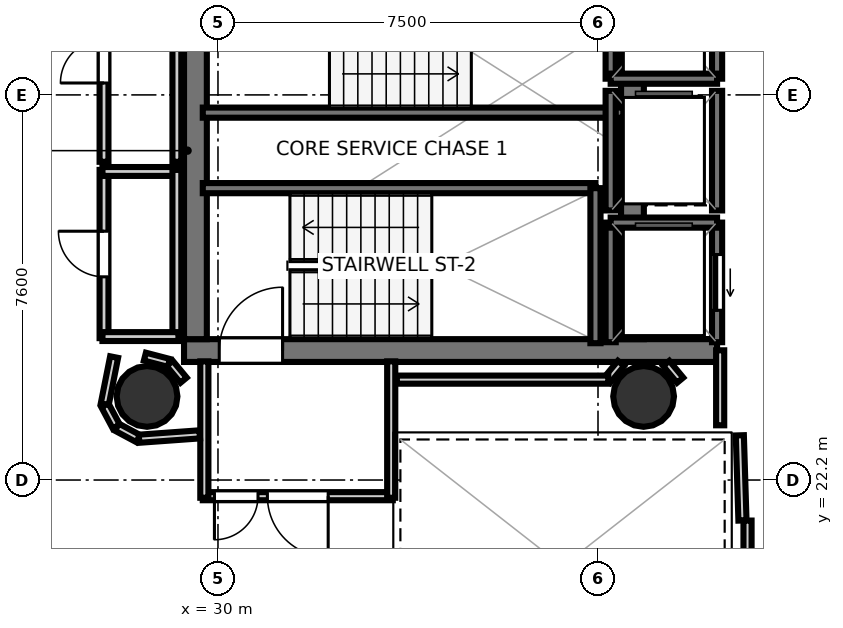
"""IFC4 building model, lengths in metres.
Left out: names, types, materials, properties, quantities, classifications, styles, units other than length and angle.
Written with IfcOpenShell. Run it as: python <this file> out.ifc"""

import sys

from ifc_helpers import new_model, si_unit, direction, frame, frame_2d, origin, origin_2d, place, context, subcontext, project, spatial, rectangle, hollow_circle, extrude, element, fill, save


model = new_model("IFC4")
c1 = context("Model", 3, precision=1e-05, world=origin(), true_north=direction((0.0, 1.0)))
c2 = subcontext(c1, "Body", "Model", "MODEL_VIEW")
j1 = project(units=[si_unit("LENGTHUNIT", "METRE"), si_unit("PLANEANGLEUNIT", "RADIAN")], contexts=[c1])
p1 = place(None, origin())
s1 = spatial("IfcSite", under=j1, at=p1, CompositionType="ELEMENT")
p2 = place(p1, origin())
s2 = spatial("IfcBuilding", under=s1, at=p2, CompositionType="ELEMENT")
p3 = place(p2, frame((0.0, 0.0, 204.0)))
s3 = spatial("IfcBuildingStorey", under=s2, at=p3, CompositionType="ELEMENT", Elevation=204.0)
p4 = place(p3, frame((29.33, 24.755, 0.0), z_axis=(0.0, 0.0, 1.0), x_axis=(1.0, 0.0, 0.0)))
e1 = element("IfcWall", 1, at=p4, inside=s3, PredefinedType="SHEAR", context=c2, shape_type="SweptSolid", body=[
    extrude(rectangle(XDim=10.52, YDim=0.45, at=frame_2d((5.26, 0.0))), origin(), (0.0, 0.0, 1.0), 3.52),
])
p5 = place(p4, frame((0.695, 0.0, 0.0)))
e2 = element("IfcOpeningElement", 2, at=p5, cuts=e1, PredefinedType="OPENING", context=c2, shape_type="SweptSolid", body=[
    extrude(rectangle(XDim=1.25, YDim=2.15, at=frame_2d((0.625, 1.075))), frame((0.0, 0.235, 0.0), z_axis=(0.0, -1.0, 0.0), x_axis=(1.0, 0.0, 0.0)), (0.0, 0.0, 1.0), 0.47),
])
for number, where, z_axis, x_axis in (
    (3, (29.555, 24.98, 0.0), (0.0, 0.0, 1.0), (0.0, 1.0, 0.0)),
    (4, (38.18, 24.98, 0.0), (0.0, 0.0, 1.0), (0.0, 1.0, 0.0)),
):
    element("IfcWall", number, at=place(p3, frame(where, z_axis=z_axis, x_axis=x_axis)), inside=s3, PredefinedType="SHEAR", context=c2, shape_type="SweptSolid", body=[
        extrude(rectangle(XDim=7.44, YDim=0.45, at=frame_2d((3.72, 0.0))), origin(), (0.0, 0.0, 1.0), 3.52),
    ])
for number, where, z_axis, x_axis in (
    (5, (28.6, 23.85, 0.0), (0.0, 0.0, 1.0), (1.0, 0.0, 0.0)),
    (6, (38.4, 23.85, 0.0), (0.0, 0.0, 1.0), (1.0, 0.0, 0.0)),
):
    element("IfcColumn", number, at=place(p3, frame(where, z_axis=z_axis, x_axis=x_axis)), inside=s3, PredefinedType="COLUMN", context=c2, shape_type="SweptSolid", body=[
        extrude(hollow_circle(Radius=0.6, WallThickness=0.03, at=origin_2d()), origin(), (0.0, 0.0, 1.0), 3.7),
    ])
p6 = place(p3, frame((29.7, 29.45, 0.0), z_axis=(0.0, 0.0, 1.0), x_axis=(1.0, 0.0, 0.0)))
e7 = element("IfcWall", 7, at=p6, inside=s3, PredefinedType="SOLIDWALL", context=c2, shape_type="SweptSolid", body=[
    extrude(rectangle(XDim=8.3, YDim=0.2, at=frame_2d((4.15, 0.0))), origin(), (0.0, 0.0, 1.0), 3.52),
])
p7 = place(p3, frame((29.7, 27.96, 0.0), z_axis=(0.0, 0.0, 1.0), x_axis=(1.0, 0.0, 0.0)))
e8 = element("IfcWall", 8, at=p7, inside=s3, PredefinedType="SOLIDWALL", context=c2, shape_type="SweptSolid", body=[
    extrude(rectangle(XDim=7.75, YDim=0.2, at=frame_2d((3.875, 0.0))), origin(), (0.0, 0.0, 1.0), 3.52),
])
p8 = place(p3, frame((37.45, 24.9, 0.0), z_axis=(0.0, 0.0, 1.0), x_axis=(0.0, 1.0, 0.0)))
e9 = element("IfcWall", 9, at=p8, inside=s3, PredefinedType="SOLIDWALL", context=c2, shape_type="SweptSolid", body=[
    extrude(rectangle(XDim=3.06, YDim=0.2, at=frame_2d((1.53, 0.0))), origin(), (0.0, 0.0, 1.0), 3.52),
])
p9 = place(p3, frame((39.85, 30.12, 0.0), z_axis=(0.0, 0.0, 1.0), x_axis=(0.0, 1.0, 0.0)))
e10 = element("IfcWall", 10, at=p9, inside=s3, PredefinedType="SOLIDWALL", context=c2, shape_type="SweptSolid", body=[
    extrude(rectangle(XDim=2.36, YDim=0.2, at=frame_2d((1.18, 0.0))), origin(), (0.0, 0.0, 1.0), 3.52),
])
p10 = place(p9, frame((0.63, 0.0, 0.0)))
e11 = element("IfcOpeningElement", 11, at=p10, cuts=e10, PredefinedType="OPENING", context=c2, shape_type="SweptSolid", body=[
    extrude(rectangle(XDim=1.1, YDim=2.15, at=frame_2d((0.55, 1.075))), frame((0.0, 0.11, 0.0), z_axis=(0.0, -1.0, 0.0), x_axis=(1.0, 0.0, 0.0)), (0.0, 0.0, 1.0), 0.22),
])
p11 = place(p3, frame((37.75, 30.12, 0.0), z_axis=(0.0, 0.0, 1.0), x_axis=(0.0, 1.0, 0.0)))
e12 = element("IfcWall", 12, at=p11, inside=s3, PredefinedType="SOLIDWALL", context=c2, shape_type="SweptSolid", body=[
    extrude(rectangle(XDim=2.36, YDim=0.2, at=frame_2d((1.18, 0.0))), origin(), (0.0, 0.0, 1.0), 3.52),
])
p12 = place(p3, frame((37.75, 30.12, 0.0), z_axis=(0.0, 0.0, 1.0), x_axis=(1.0, 0.0, 0.0)))
e13 = element("IfcWall", 13, at=p12, inside=s3, PredefinedType="SOLIDWALL", context=c2, shape_type="SweptSolid", body=[
    extrude(rectangle(XDim=2.1, YDim=0.2, at=frame_2d((1.05, 0.0))), origin(), (0.0, 0.0, 1.0), 3.52),
])
p13 = place(p3, frame((39.85, 24.92, 0.0), z_axis=(0.0, 0.0, 1.0), x_axis=(0.0, 1.0, 0.0)))
e14 = element("IfcWall", 14, at=p13, inside=s3, PredefinedType="SOLIDWALL", context=c2, shape_type="SweptSolid", body=[
    extrude(rectangle(XDim=2.36, YDim=0.2, at=frame_2d((1.18, 0.0))), origin(), (0.0, 0.0, 1.0), 3.52),
])
p14 = place(p13, frame((0.63, 0.0, 0.0)))
e15 = element("IfcOpeningElement", 15, at=p14, cuts=e14, PredefinedType="OPENING", context=c2, shape_type="SweptSolid", body=[
    extrude(rectangle(XDim=1.1, YDim=2.15, at=frame_2d((0.55, 1.075))), frame((0.0, 0.11, 0.0), z_axis=(0.0, -1.0, 0.0), x_axis=(1.0, 0.0, 0.0)), (0.0, 0.0, 1.0), 0.22),
])
p15 = place(p3, frame((37.75, 24.92, 0.0), z_axis=(0.0, 0.0, 1.0), x_axis=(0.0, 1.0, 0.0)))
e16 = element("IfcWall", 16, at=p15, inside=s3, PredefinedType="SOLIDWALL", context=c2, shape_type="SweptSolid", body=[
    extrude(rectangle(XDim=2.36, YDim=0.2, at=frame_2d((1.18, 0.0))), origin(), (0.0, 0.0, 1.0), 3.52),
])
p16 = place(p3, frame((37.75, 27.28, 0.0), z_axis=(0.0, 0.0, 1.0), x_axis=(1.0, 0.0, 0.0)))
e17 = element("IfcWall", 17, at=p16, inside=s3, PredefinedType="SOLIDWALL", context=c2, shape_type="SweptSolid", body=[
    extrude(rectangle(XDim=2.1, YDim=0.2, at=frame_2d((1.05, 0.0))), origin(), (0.0, 0.0, 1.0), 3.52),
])
for number, where, z_axis, x_axis in (
    (18, (39.85, 27.52, 0.0), (0.0, 0.0, 1.0), (0.0, 1.0, 0.0)),
    (19, (37.75, 27.52, 0.0), (0.0, 0.0, 1.0), (0.0, 1.0, 0.0)),
):
    element("IfcWall", number, at=place(p3, frame(where, z_axis=z_axis, x_axis=x_axis)), inside=s3, PredefinedType="SOLIDWALL", context=c2, shape_type="SweptSolid", body=[
        extrude(rectangle(XDim=2.36, YDim=0.2, at=frame_2d((1.18, 0.0))), origin(), (0.0, 0.0, 1.0), 3.52),
    ])
p17 = place(p3, frame((33.45, 21.881, 0.0), z_axis=(0.0, 0.0, 1.0), x_axis=(-1.0, 0.0, 0.0)))
e20 = element("IfcWall", 20, at=p17, inside=s3, PredefinedType="PARTITIONING", context=c2, shape_type="SweptSolid", body=[
    extrude(rectangle(XDim=3.75, YDim=0.16, at=frame_2d((1.875, 0.0))), origin(), (0.0, 0.0, 1.0), 2.84),
])
p18 = place(p17, frame((1.275, 0.0, 0.0)))
e21 = element("IfcOpeningElement", 21, at=p18, cuts=e20, PredefinedType="OPENING", context=c2, shape_type="SweptSolid", body=[
    extrude(rectangle(XDim=1.2, YDim=2.15, at=frame_2d((0.6, 1.075))), frame((0.0, 0.09, 0.0), z_axis=(0.0, -1.0, 0.0), x_axis=(1.0, 0.0, 0.0)), (0.0, 0.0, 1.0), 0.18),
])
p19 = place(p17, frame((2.66, 0.0, 0.0)))
e22 = element("IfcOpeningElement", 22, at=p19, cuts=e20, PredefinedType="OPENING", context=c2, shape_type="SweptSolid", body=[
    extrude(rectangle(XDim=0.86, YDim=2.05, at=frame_2d((0.43, 1.025))), frame((0.0, 0.09, 0.0), z_axis=(0.0, -1.0, 0.0), x_axis=(1.0, 0.0, 0.0)), (0.0, 0.0, 1.0), 0.18),
])
for number, where, z_axis, x_axis in (
    (23, (29.731, 21.85, 0.0), (0.0, 0.0, 1.0), (0.0, 1.0, 0.0)),
    (24, (33.419, 24.542, 0.0), (0.0, 0.0, 1.0), (0.0, -1.0, 0.0)),
):
    element("IfcWall", number, at=place(p3, frame(where, z_axis=z_axis, x_axis=x_axis)), inside=s3, PredefinedType="PARTITIONING", context=c2, shape_type="SweptSolid", body=[
        extrude(rectangle(XDim=2.692, YDim=0.16, at=frame_2d((1.346, 0.0))), origin(), (0.0, 0.0, 1.0), 2.84),
    ])
p20 = place(p3, frame((40.351, 21.401, 0.0), z_axis=(0.0, 0.0, 1.0), x_axis=(-0.031058045979, 0.999517582527, 0.0)))
e25 = element("IfcWall", 25, at=p20, inside=s3, PredefinedType="PARTITIONING", context=c2, shape_type="SweptSolid", body=[
    extrude(rectangle(XDim=1.682, YDim=0.16, at=frame_2d((0.841, 0.0))), origin(), (0.0, 0.0, 1.0), 2.84),
])
p21 = place(p3, frame((39.911, 23.28, 0.0), z_axis=(0.0, 0.0, 1.0), x_axis=(0.0, 1.0, 0.0)))
e26 = element("IfcWall", 26, at=p21, inside=s3, PredefinedType="PARTITIONING", context=c2, shape_type="SweptSolid", body=[
    extrude(rectangle(XDim=1.48, YDim=0.16, at=frame_2d((0.74, 0.0))), origin(), (0.0, 0.0, 1.0), 2.84),
])
p22 = place(p3, frame((40.451, 18.08, 0.0), z_axis=(0.0, 0.0, 1.0), x_axis=(0.0, 1.0, 0.0)))
e27 = element("IfcWall", 27, at=p22, inside=s3, PredefinedType="PARTITIONING", context=c2, shape_type="SweptSolid", body=[
    extrude(rectangle(XDim=3.32, YDim=0.16, at=frame_2d((1.66, 0.0))), origin(), (0.0, 0.0, 1.0), 2.84),
])
p23 = place(p3, frame((27.751, 25.0, 0.0), z_axis=(0.0, 0.0, 1.0), x_axis=(0.0, 1.0, 0.0)))
e28 = element("IfcWall", 28, at=p23, inside=s3, PredefinedType="PLUMBINGWALL", context=c2, shape_type="SweptSolid", body=[
    extrude(rectangle(XDim=3.32, YDim=0.175, at=frame_2d((1.66, 0.0))), origin(), (0.0, 0.0, 1.0), 2.84),
])
p24 = place(p23, frame((1.21, 0.0, 0.0)))
e29 = element("IfcOpeningElement", 29, at=p24, cuts=e28, PredefinedType="OPENING", context=c2, shape_type="SweptSolid", body=[
    extrude(rectangle(XDim=0.9, YDim=2.1, at=frame_2d((0.45, 1.05))), frame((0.0, 0.097, 0.0), z_axis=(0.0, -1.0, 0.0), x_axis=(1.0, 0.0, 0.0)), (0.0, 0.0, 1.0), 0.195),
])
p25 = place(p3, frame((27.72, 28.289, 0.0), z_axis=(0.0, 0.0, 1.0), x_axis=(1.0, 0.0, 0.0)))
e30 = element("IfcWall", 30, at=p25, inside=s3, PredefinedType="PLUMBINGWALL", context=c2, shape_type="SweptSolid", body=[
    extrude(rectangle(XDim=1.5, YDim=0.175, at=frame_2d((0.75, 0.0))), origin(), (0.0, 0.0, 1.0), 2.84),
])
p26 = place(p3, frame((29.189, 28.32, 0.0), z_axis=(0.0, 0.0, 1.0), x_axis=(0.0, -1.0, 0.0)))
e31 = element("IfcWall", 31, at=p26, inside=s3, PredefinedType="PLUMBINGWALL", context=c2, shape_type="SweptSolid", body=[
    extrude(rectangle(XDim=3.32, YDim=0.175, at=frame_2d((1.66, 0.0))), origin(), (0.0, 0.0, 1.0), 2.84),
])
p27 = place(p3, frame((29.22, 25.031, 0.0), z_axis=(0.0, 0.0, 1.0), x_axis=(-1.0, 0.0, 0.0)))
e32 = element("IfcWall", 32, at=p27, inside=s3, PredefinedType="PLUMBINGWALL", context=c2, shape_type="SweptSolid", body=[
    extrude(rectangle(XDim=1.5, YDim=0.175, at=frame_2d((0.75, 0.0))), origin(), (0.0, 0.0, 1.0), 2.84),
])
p28 = place(p3, frame((27.751, 28.48, 0.0), z_axis=(0.0, 0.0, 1.0), x_axis=(0.0, 1.0, 0.0)))
e33 = element("IfcWall", 33, at=p28, inside=s3, PredefinedType="PLUMBINGWALL", context=c2, shape_type="SweptSolid", body=[
    extrude(rectangle(XDim=3.97, YDim=0.175, at=frame_2d((1.985, 0.0))), origin(), (0.0, 0.0, 1.0), 2.84),
])
p29 = place(p28, frame((1.555, 0.0, 0.0)))
e34 = element("IfcOpeningElement", 34, at=p29, cuts=e33, PredefinedType="OPENING", context=c2, shape_type="SweptSolid", body=[
    extrude(rectangle(XDim=0.86, YDim=2.05, at=frame_2d((0.43, 1.025))), frame((0.0, 0.097, 0.0), z_axis=(0.0, -1.0, 0.0), x_axis=(1.0, 0.0, 0.0)), (0.0, 0.0, 1.0), 0.195),
])
p30 = place(p3, frame((29.189, 32.45, 0.0), z_axis=(0.0, 0.0, 1.0), x_axis=(0.0, -1.0, 0.0)))
e35 = element("IfcWall", 35, at=p30, inside=s3, PredefinedType="PLUMBINGWALL", context=c2, shape_type="SweptSolid", body=[
    extrude(rectangle(XDim=3.97, YDim=0.175, at=frame_2d((1.985, 0.0))), origin(), (0.0, 0.0, 1.0), 2.84),
])
p31 = place(p3, frame((29.321, 24.17, 0.0), z_axis=(0.0, 0.0, 1.0), x_axis=(-0.638008265708, 0.770029514296, 0.0)))
e36 = element("IfcWall", 36, at=p31, inside=s3, PredefinedType="PARTITIONING", context=c2, shape_type="SweptSolid", body=[
    extrude(rectangle(XDim=0.431, YDim=0.16, at=frame_2d((0.215, 0.0))), origin(), (0.0, 0.0, 1.0), 2.84),
])
p32 = place(p3, frame((29.03, 24.512, 0.0), z_axis=(0.0, 0.0, 1.0), x_axis=(-0.967681003213, 0.252177469296, 0.0)))
e37 = element("IfcWall", 37, at=p32, inside=s3, PredefinedType="PARTITIONING", context=c2, shape_type="SweptSolid", body=[
    extrude(rectangle(XDim=0.488, YDim=0.16, at=frame_2d((0.244, 0.0))), origin(), (0.0, 0.0, 1.0), 2.84),
])
for number, where, z_axis, x_axis in (
    (38, (39.121, 24.17, 0.0), (0.0, 0.0, 1.0), (-0.638, 0.77, 0.0)),
    (39, (37.954, 24.502, 0.0), (0.0, 0.0, 1.0), (-0.638, -0.77, 0.0)),
):
    element("IfcWall", number, at=place(p3, frame(where, z_axis=z_axis, x_axis=x_axis)), inside=s3, PredefinedType="PARTITIONING", context=c2, shape_type="SweptSolid", body=[
        extrude(rectangle(XDim=0.431, YDim=0.16, at=frame_2d((0.215, 0.0))), origin(), (0.0, 0.0, 1.0), 2.84),
    ])
p33 = place(p3, frame((37.703, 24.181, 0.0), z_axis=(0.0, 0.0, 1.0), x_axis=(-1.0, 0.0, 0.0)))
e40 = element("IfcWall", 40, at=p33, inside=s3, PredefinedType="PARTITIONING", context=c2, shape_type="SweptSolid", body=[
    extrude(rectangle(XDim=4.173, YDim=0.16, at=frame_2d((2.086, 0.0))), origin(), (0.0, 0.0, 1.0), 2.84),
])
p34 = place(p3, frame((27.95, 24.626, 0.0), z_axis=(0.0, 0.0, 1.0), x_axis=(-0.195125950178, -0.980778192848, 0.0)))
e41 = element("IfcWall", 41, at=p34, inside=s3, PredefinedType="PARTITIONING", context=c2, shape_type="SweptSolid", body=[
    extrude(rectangle(XDim=0.948, YDim=0.16, at=frame_2d((0.474, 0.0))), origin(), (0.0, 0.0, 1.0), 2.84),
])
for number, where, z_axis, x_axis in (
    (42, (27.768, 23.675, 0.0), (0.0, 0.0, 1.0), (0.472, -0.882, 0.0)),
    (43, (28.006, 23.243, 0.0), (0.0, 0.0, 1.0), (0.882, -0.472, 0.0)),
):
    element("IfcWall", number, at=place(p3, frame(where, z_axis=z_axis, x_axis=x_axis)), inside=s3, PredefinedType="PARTITIONING", context=c2, shape_type="SweptSolid", body=[
        extrude(rectangle(XDim=0.476, YDim=0.16, at=frame_2d((0.238, 0.0))), origin(), (0.0, 0.0, 1.0), 2.84),
    ])
p35 = place(p3, frame((28.442, 23.015, 0.0), z_axis=(0.0, 0.0, 1.0), x_axis=(0.99740683837, 0.07196942943, 0.0)))
e44 = element("IfcWall", 44, at=p35, inside=s3, PredefinedType="PARTITIONING", context=c2, shape_type="SweptSolid", body=[
    extrude(rectangle(XDim=1.201, YDim=0.16, at=frame_2d((0.601, 0.0))), origin(), (0.0, 0.0, 1.0), 2.84),
])
p36 = place(p5, origin())
e45 = element("IfcDoor", 45, at=p36, inside=s3, OperationType="SINGLE_SWING_RIGHT", PredefinedType="DOOR", context=c2, shape_type="SweptSolid", body=[
    extrude(rectangle(XDim=1.25, YDim=2.15, at=frame_2d((0.625, 1.075))), frame((0.0, 0.025, 0.0), z_axis=(0.0, -1.0, 0.0), x_axis=(1.0, 0.0, 0.0)), (0.0, 0.0, 1.0), 0.05),
])
fill(e2, e45)
p37 = place(p14, origin())
e46 = element("IfcDoor", 46, at=p37, inside=s3, OperationType="SLIDING_TO_LEFT", PredefinedType="DOOR", context=c2, shape_type="SweptSolid", body=[
    extrude(rectangle(XDim=1.1, YDim=2.15, at=frame_2d((0.55, 1.075))), frame((0.0, 0.025, 0.0), z_axis=(0.0, -1.0, 0.0), x_axis=(1.0, 0.0, 0.0)), (0.0, 0.0, 1.0), 0.05),
])
fill(e15, e46)
p38 = place(p18, origin())
e47 = element("IfcDoor", 47, at=p38, inside=s3, OperationType="SINGLE_SWING_LEFT", PredefinedType="DOOR", context=c2, shape_type="SweptSolid", body=[
    extrude(rectangle(XDim=1.2, YDim=2.15, at=frame_2d((0.6, 1.075))), frame((0.0, 0.025, 0.0), z_axis=(0.0, -1.0, 0.0), x_axis=(1.0, 0.0, 0.0)), (0.0, 0.0, 1.0), 0.05),
])
fill(e21, e47)
p39 = place(p24, origin())
e48 = element("IfcDoor", 48, at=p39, inside=s3, OperationType="SINGLE_SWING_RIGHT", PredefinedType="DOOR", context=c2, shape_type="SweptSolid", body=[
    extrude(rectangle(XDim=0.9, YDim=2.1, at=frame_2d((0.45, 1.05))), frame((0.0, 0.025, 0.0), z_axis=(0.0, -1.0, 0.0), x_axis=(1.0, 0.0, 0.0)), (0.0, 0.0, 1.0), 0.05),
])
fill(e29, e48)
p40 = place(p29, origin())
e49 = element("IfcDoor", 49, at=p40, inside=s3, OperationType="SINGLE_SWING_LEFT", PredefinedType="DOOR", context=c2, shape_type="SweptSolid", body=[
    extrude(rectangle(XDim=0.86, YDim=2.05, at=frame_2d((0.43, 1.025))), frame((0.0, 0.025, 0.0), z_axis=(0.0, -1.0, 0.0), x_axis=(1.0, 0.0, 0.0)), (0.0, 0.0, 1.0), 0.05),
])
fill(e34, e49)
p41 = place(p19, origin())
e50 = element("IfcDoor", 50, at=p41, inside=s3, OperationType="SINGLE_SWING_RIGHT", PredefinedType="DOOR", context=c2, shape_type="SweptSolid", body=[
    extrude(rectangle(XDim=0.86, YDim=2.05, at=frame_2d((0.43, 1.025))), frame((0.0, 0.025, 0.0), z_axis=(0.0, -1.0, 0.0), x_axis=(1.0, 0.0, 0.0)), (0.0, 0.0, 1.0), 0.05),
])
fill(e22, e50)
save(model, sys.argv[1])
